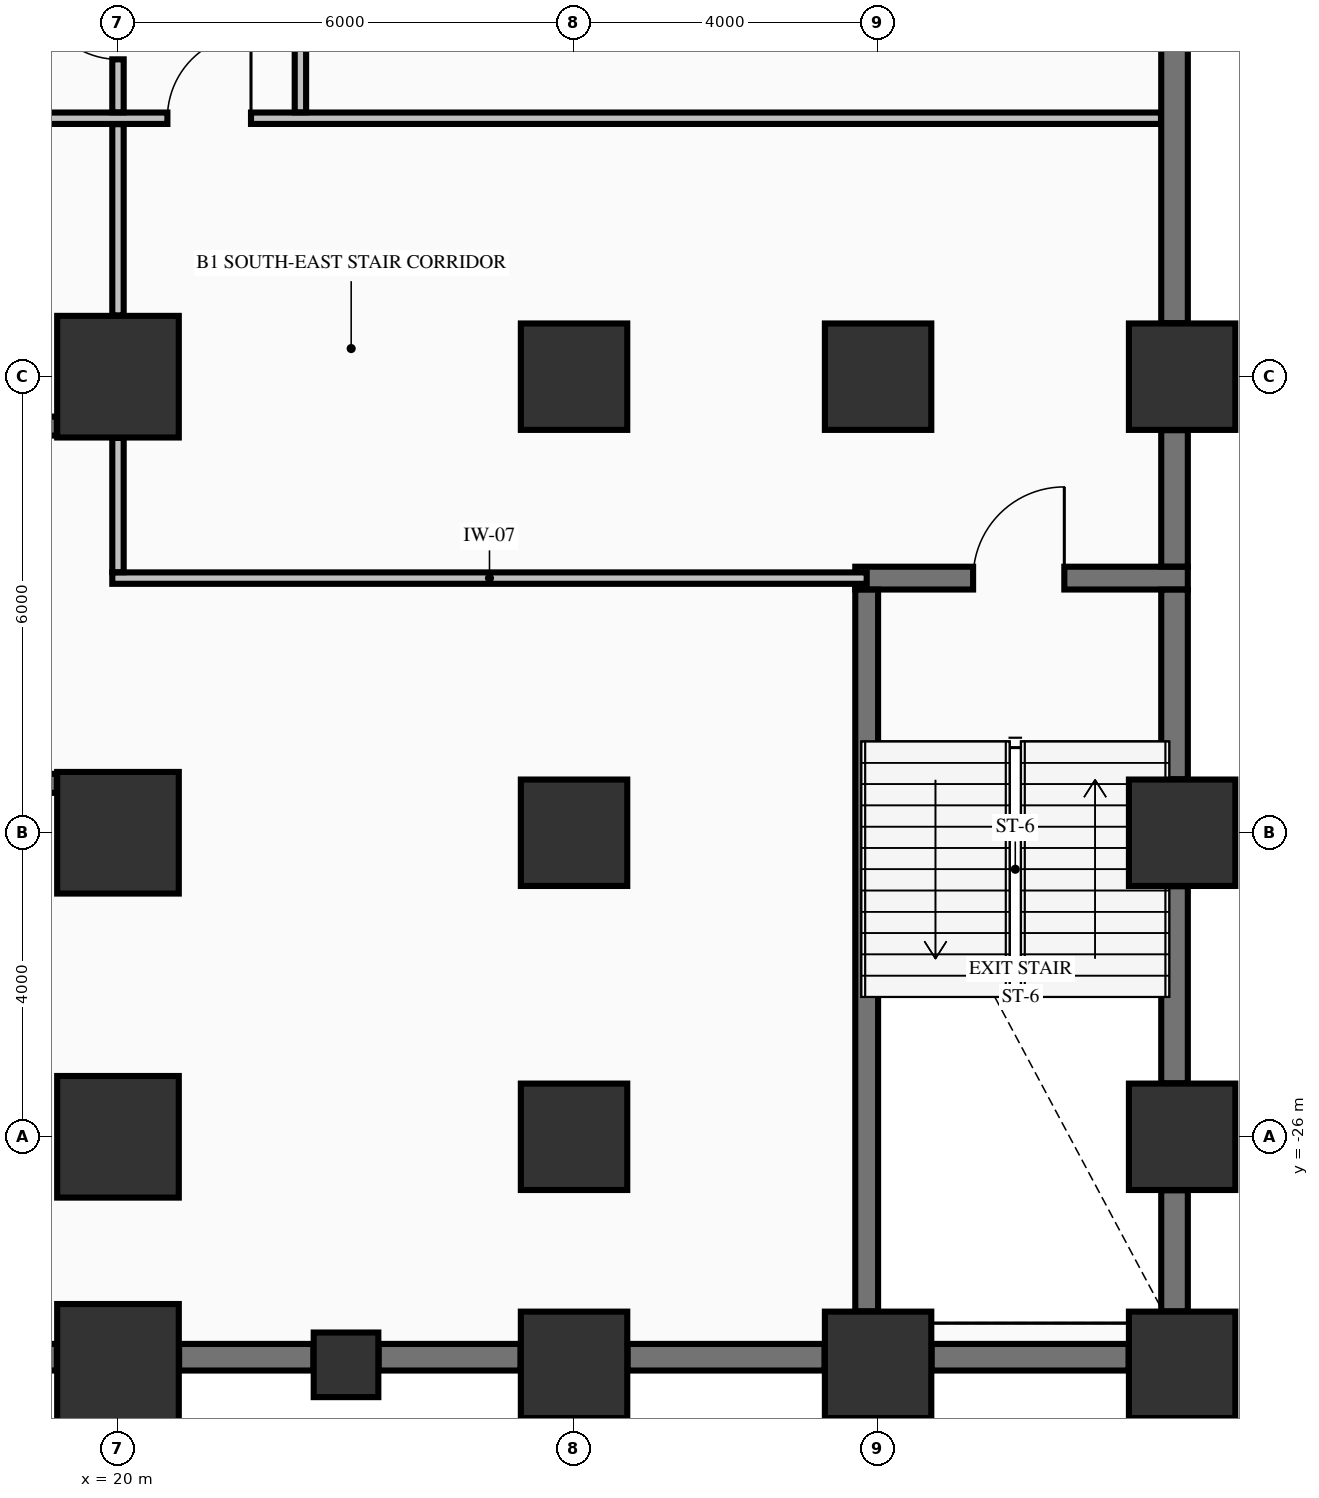
"""IFC4 building model, lengths in metres.
Left out: names, types, materials, properties, quantities, classifications, styles, units other than length and angle.
Written with IfcOpenShell. Run it as: python <this file> out.ifc"""

import sys

from ifc_helpers import new_model, si_unit, direction, frame, frame_2d, origin, origin_2d, place, context, subcontext, project, spatial, rectangle, extrude, element, fill, save


model = new_model("IFC4")
c1 = context("Model", 3, precision=1e-05, world=origin(), true_north=direction((0.0, 1.0)))
c2 = subcontext(c1, "Body", "Model", "MODEL_VIEW")
j1 = project(units=[si_unit("LENGTHUNIT", "METRE"), si_unit("PLANEANGLEUNIT", "RADIAN")], contexts=[c1])
p1 = place(None, origin())
s1 = spatial("IfcSite", under=j1, at=p1, CompositionType="ELEMENT")
p2 = place(p1, origin())
s2 = spatial("IfcBuilding", under=s1, at=p2, CompositionType="ELEMENT")
p3 = place(p2, frame((0.0, 0.0, -4.55)))
s3 = spatial("IfcBuildingStorey", under=s2, at=p3, CompositionType="ELEMENT", Elevation=-4.55)
for number, where, z_axis, x_axis in (
    (1, (20.0, -29.0, 0.0), (0.0, 0.0, 1.0), (1.0, 0.0, 0.0)),
    (2, (20.0, -26.0, 0.0), (0.0, 0.0, 1.0), (1.0, 0.0, 0.0)),
    (3, (20.0, -22.0, 0.0), (0.0, 0.0, 1.0), (1.0, 0.0, 0.0)),
    (4, (20.0, -16.0, 0.0), (0.0, 0.0, 1.0), (1.0, 0.0, 0.0)),
):
    element("IfcColumn", number, at=place(p3, frame(where, z_axis=z_axis, x_axis=x_axis)), inside=s3, PredefinedType="COLUMN", context=c2, shape_type="SweptSolid", body=[
        extrude(rectangle(XDim=1.6, YDim=1.6, at=origin_2d()), origin(), (0.0, 0.0, 1.0), 4.2),
    ])
for number, where, z_axis, x_axis in (
    (5, (26.0, -29.0, 0.0), (0.0, 0.0, 1.0), (1.0, 0.0, 0.0)),
    (6, (26.0, -26.0, 0.0), (0.0, 0.0, 1.0), (1.0, 0.0, 0.0)),
    (7, (26.0, -22.0, 0.0), (0.0, 0.0, 1.0), (1.0, 0.0, 0.0)),
    (8, (26.0, -16.0, 0.0), (0.0, 0.0, 1.0), (1.0, 0.0, 0.0)),
    (9, (30.0, -29.0, 0.0), (0.0, 0.0, 1.0), (1.0, 0.0, 0.0)),
    (10, (30.0, -16.0, 0.0), (0.0, 0.0, 1.0), (1.0, 0.0, 0.0)),
    (11, (34.0, -29.0, 0.0), (0.0, 0.0, 1.0), (1.0, 0.0, 0.0)),
    (12, (34.0, -26.0, 0.0), (0.0, 0.0, 1.0), (1.0, 0.0, 0.0)),
    (13, (34.0, -22.0, 0.0), (0.0, 0.0, 1.0), (1.0, 0.0, 0.0)),
    (14, (34.0, -16.0, 0.0), (0.0, 0.0, 1.0), (1.0, 0.0, 0.0)),
):
    element("IfcColumn", number, at=place(p3, frame(where, z_axis=z_axis, x_axis=x_axis)), inside=s3, PredefinedType="COLUMN", context=c2, shape_type="SweptSolid", body=[
        extrude(rectangle(XDim=1.4, YDim=1.4, at=origin_2d()), origin(), (0.0, 0.0, 1.0), 4.2),
    ])
p4 = place(p3, frame((23.0, -29.0, 0.0), z_axis=(0.0, 0.0, 1.0), x_axis=(1.0, 0.0, 0.0)))
e15 = element("IfcColumn", 15, at=p4, inside=s3, PredefinedType="PILASTER", context=c2, shape_type="SweptSolid", body=[
    extrude(rectangle(XDim=0.85, YDim=0.85, at=origin_2d()), origin(), (0.0, 0.0, 1.0), 4.2),
])
p5 = place(p3, frame((11.804, -28.9, 0.0), z_axis=(0.0, 0.0, 1.0), x_axis=(1.0, 0.0, 0.0)))
e16 = element("IfcWall", 16, at=p5, inside=s3, PredefinedType="SHEAR", context=c2, shape_type="SweptSolid", body=[
    extrude(rectangle(XDim=7.392, YDim=0.35, at=frame_2d((3.696, 0.0))), origin(), (0.0, 0.0, 1.0), 4.2),
])
p6 = place(p3, frame((20.804, -28.9, 0.0), z_axis=(0.0, 0.0, 1.0), x_axis=(1.0, 0.0, 0.0)))
e17 = element("IfcWall", 17, at=p6, inside=s3, PredefinedType="SHEAR", context=c2, shape_type="SweptSolid", body=[
    extrude(rectangle(XDim=1.767, YDim=0.35, at=frame_2d((0.884, 0.0))), origin(), (0.0, 0.0, 1.0), 4.2),
])
p7 = place(p3, frame((23.429, -28.9, 0.0), z_axis=(0.0, 0.0, 1.0), x_axis=(1.0, 0.0, 0.0)))
e18 = element("IfcWall", 18, at=p7, inside=s3, PredefinedType="SHEAR", context=c2, shape_type="SweptSolid", body=[
    extrude(rectangle(XDim=1.867, YDim=0.35, at=frame_2d((0.934, 0.0))), origin(), (0.0, 0.0, 1.0), 4.2),
])
for number, where, z_axis, x_axis in (
    (19, (26.704, -28.9, 0.0), (0.0, 0.0, 1.0), (1.0, 0.0, 0.0)),
    (20, (30.704, -28.9, 0.0), (0.0, 0.0, 1.0), (1.0, 0.0, 0.0)),
):
    element("IfcWall", number, at=place(p3, frame(where, z_axis=z_axis, x_axis=x_axis)), inside=s3, PredefinedType="SHEAR", context=c2, shape_type="SweptSolid", body=[
        extrude(rectangle(XDim=2.592, YDim=0.35, at=frame_2d((1.296, 0.0))), origin(), (0.0, 0.0, 1.0), 4.2),
    ])
p8 = place(p3, frame((11.804, -21.35, 0.0), z_axis=(0.0, 0.0, 1.0), x_axis=(1.0, 0.0, 0.0)))
e21 = element("IfcWall", 21, at=p8, inside=s3, PredefinedType="SOLIDWALL", context=c2, shape_type="SweptSolid", body=[
    extrude(rectangle(XDim=7.392, YDim=0.25, at=frame_2d((3.696, 0.0))), origin(), (0.0, 0.0, 1.0), 4.2),
])
p9 = place(p3, frame((29.7, -18.65, 0.0), z_axis=(0.0, 0.0, 1.0), x_axis=(1.0, 0.0, 0.0)))
e22 = element("IfcWall", 22, at=p9, inside=s3, PredefinedType="SHEAR", context=c2, shape_type="SweptSolid", body=[
    extrude(rectangle(XDim=4.375, YDim=0.3, at=frame_2d((2.188, 0.0))), origin(), (0.0, 0.0, 1.0), 4.2),
])
p10 = place(p9, frame((1.55, 0.0, 0.0)))
e23 = element("IfcOpeningElement", 23, at=p10, cuts=e22, PredefinedType="OPENING", context=c2, shape_type="SweptSolid", body=[
    extrude(rectangle(XDim=1.2, YDim=2.15, at=frame_2d((0.6, 1.075))), frame((0.0, 0.16, 0.0), z_axis=(0.0, -1.0, 0.0), x_axis=(1.0, 0.0, 0.0)), (0.0, 0.0, 1.0), 0.32),
])
p11 = place(p3, frame((11.804, -16.65, 0.0), z_axis=(0.0, 0.0, 1.0), x_axis=(1.0, 0.0, 0.0)))
e24 = element("IfcWall", 24, at=p11, inside=s3, PredefinedType="SOLIDWALL", context=c2, shape_type="SweptSolid", body=[
    extrude(rectangle(XDim=7.392, YDim=0.25, at=frame_2d((3.696, 0.0))), origin(), (0.0, 0.0, 1.0), 4.2),
])
p12 = place(p3, frame((19.925, -18.65, 0.0), z_axis=(0.0, 0.0, 1.0), x_axis=(1.0, 0.0, 0.0)))
e25 = element("IfcWall", 25, at=p12, inside=s3, PredefinedType="PARTITIONING", context=c2, shape_type="SweptSolid", body=[
    extrude(rectangle(XDim=9.925, YDim=0.15, at=frame_2d((4.962, 0.0))), origin(), (0.0, 0.0, 1.0), 4.2),
])
p13 = place(p3, frame((-33.722, -12.6, 0.0), z_axis=(0.0, 0.0, 1.0), x_axis=(1.0, 0.0, 0.0)))
e26 = element("IfcWall", 26, at=p13, inside=s3, PredefinedType="PARTITIONING", context=c2, shape_type="SweptSolid", body=[
    extrude(rectangle(XDim=67.444, YDim=0.15, at=frame_2d((33.722, 0.0))), origin(), (0.0, 0.0, 1.0), 3.74),
])
p14 = place(p13, frame((11.972, 0.0, 0.0)))
e27 = element("IfcOpeningElement", 27, at=p14, cuts=e26, PredefinedType="OPENING", context=c2, shape_type="SweptSolid", body=[
    extrude(rectangle(XDim=1.1, YDim=2.15, at=frame_2d((0.55, 1.075))), frame((0.0, 0.085, 0.0), z_axis=(0.0, -1.0, 0.0), x_axis=(1.0, 0.0, 0.0)), (0.0, 0.0, 1.0), 0.17),
])
p15 = place(p13, frame((54.372, 0.0, 0.0)))
e28 = element("IfcOpeningElement", 28, at=p15, cuts=e26, PredefinedType="OPENING", context=c2, shape_type="SweptSolid", body=[
    extrude(rectangle(XDim=1.1, YDim=2.15, at=frame_2d((0.55, 1.075))), frame((0.0, 0.085, 0.0), z_axis=(0.0, -1.0, 0.0), x_axis=(1.0, 0.0, 0.0)), (0.0, 0.0, 1.0), 0.17),
])
p16 = place(p13, frame((38.622, 0.0, 0.0)))
e29 = element("IfcOpeningElement", 29, at=p16, cuts=e26, PredefinedType="OPENING", context=c2, shape_type="SweptSolid", body=[
    extrude(rectangle(XDim=1.2, YDim=2.15, at=frame_2d((0.6, 1.075))), frame((0.0, 0.085, 0.0), z_axis=(0.0, -1.0, 0.0), x_axis=(1.0, 0.0, 0.0)), (0.0, 0.0, 1.0), 0.17),
])
p17 = place(p3, frame((29.85, -28.296, 0.0), z_axis=(0.0, 0.0, 1.0), x_axis=(0.0, 1.0, 0.0)))
e30 = element("IfcWall", 30, at=p17, inside=s3, PredefinedType="SHEAR", context=c2, shape_type="SweptSolid", body=[
    extrude(rectangle(XDim=9.494, YDim=0.3, at=frame_2d((4.747, 0.0))), origin(), (0.0, 0.0, 1.0), 4.2),
])
p18 = place(p3, frame((33.9, -28.296, 0.0), z_axis=(0.0, 0.0, 1.0), x_axis=(0.0, 1.0, 0.0)))
e31 = element("IfcWall", 31, at=p18, inside=s3, PredefinedType="SHEAR", context=c2, shape_type="SweptSolid", body=[
    extrude(rectangle(XDim=1.592, YDim=0.35, at=frame_2d((0.796, 0.0))), origin(), (0.0, 0.0, 1.0), 4.2),
])
p19 = place(p3, frame((33.9, -25.296, 0.0), z_axis=(0.0, 0.0, 1.0), x_axis=(0.0, 1.0, 0.0)))
e32 = element("IfcWall", 32, at=p19, inside=s3, PredefinedType="SHEAR", context=c2, shape_type="SweptSolid", body=[
    extrude(rectangle(XDim=2.592, YDim=0.35, at=frame_2d((1.296, 0.0))), origin(), (0.0, 0.0, 1.0), 4.2),
])
p20 = place(p3, frame((33.9, -21.296, 0.0), z_axis=(0.0, 0.0, 1.0), x_axis=(0.0, 1.0, 0.0)))
e33 = element("IfcWall", 33, at=p20, inside=s3, PredefinedType="SHEAR", context=c2, shape_type="SweptSolid", body=[
    extrude(rectangle(XDim=2.494, YDim=0.35, at=frame_2d((1.247, 0.0))), origin(), (0.0, 0.0, 1.0), 4.2),
])
p21 = place(p3, frame((33.9, -18.498, 0.0), z_axis=(0.0, 0.0, 1.0), x_axis=(0.0, 1.0, 0.0)))
e34 = element("IfcWall", 34, at=p21, inside=s3, PredefinedType="SHEAR", context=c2, shape_type="SweptSolid", body=[
    extrude(rectangle(XDim=1.794, YDim=0.35, at=frame_2d((0.897, 0.0))), origin(), (0.0, 0.0, 1.0), 4.2),
])
p22 = place(p3, frame((33.9, -15.296, 0.0), z_axis=(0.0, 0.0, 1.0), x_axis=(0.0, 1.0, 0.0)))
e35 = element("IfcWall", 35, at=p22, inside=s3, PredefinedType="SHEAR", context=c2, shape_type="SweptSolid", body=[
    extrude(rectangle(XDim=5.592, YDim=0.35, at=frame_2d((2.796, 0.0))), origin(), (0.0, 0.0, 1.0), 4.2),
])
p23 = place(p3, frame((20.0, -18.572, 0.0), z_axis=(0.0, 0.0, 1.0), x_axis=(0.0, 1.0, 0.0)))
e36 = element("IfcWall", 36, at=p23, inside=s3, PredefinedType="PARTITIONING", context=c2, shape_type="SweptSolid", body=[
    extrude(rectangle(XDim=1.766, YDim=0.15, at=frame_2d((0.883, 0.0))), origin(), (0.0, 0.0, 1.0), 3.242),
])
p24 = place(p3, frame((20.0, -15.194, 0.0), z_axis=(0.0, 0.0, 1.0), x_axis=(0.0, 1.0, 0.0)))
e37 = element("IfcWall", 37, at=p24, inside=s3, PredefinedType="PARTITIONING", context=c2, shape_type="SweptSolid", body=[
    extrude(rectangle(XDim=2.516, YDim=0.15, at=frame_2d((1.258, 0.0))), origin(), (0.0, 0.0, 1.0), 3.242),
])
p25 = place(p3, frame((20.0, -12.522, 0.0), z_axis=(0.0, 0.0, 1.0), x_axis=(0.0, 1.0, 0.0)))
e38 = element("IfcWall", 38, at=p25, inside=s3, PredefinedType="PARTITIONING", context=c2, shape_type="SweptSolid", body=[
    extrude(rectangle(XDim=2.394, YDim=0.15, at=frame_2d((1.197, 0.0))), origin(), (0.0, 0.0, 1.0), 3.242),
])
p26 = place(p25, frame((0.697, 0.0, 0.0)))
e39 = element("IfcOpeningElement", 39, at=p26, cuts=e38, PredefinedType="OPENING", context=c2, shape_type="SweptSolid", body=[
    extrude(rectangle(XDim=1.05, YDim=2.15, at=frame_2d((0.525, 1.075))), frame((0.0, 0.085, 0.0), z_axis=(0.0, -1.0, 0.0), x_axis=(1.0, 0.0, 0.0)), (0.0, 0.0, 1.0), 0.17),
])
p27 = place(p3, frame((22.4, -12.522, 0.0), z_axis=(0.0, 0.0, 1.0), x_axis=(0.0, 1.0, 0.0)))
e40 = element("IfcWall", 40, at=p27, inside=s3, PredefinedType="PARTITIONING", context=c2, shape_type="SweptSolid", body=[
    extrude(rectangle(XDim=25.644, YDim=0.15, at=frame_2d((12.822, 0.0))), origin(), (0.0, 0.0, 1.0), 4.2),
])
p28 = place(p10, origin())
e41 = element("IfcDoor", 41, at=p28, inside=s3, OperationType="SINGLE_SWING_RIGHT", PredefinedType="DOOR", context=c2, shape_type="SweptSolid", body=[
    extrude(rectangle(XDim=1.2, YDim=2.15, at=frame_2d((0.6, 1.075))), frame((0.0, 0.025, 0.0), z_axis=(0.0, -1.0, 0.0), x_axis=(1.0, 0.0, 0.0)), (0.0, 0.0, 1.0), 0.05),
])
fill(e23, e41)
p29 = place(p26, origin())
e42 = element("IfcDoor", 42, at=p29, inside=s3, OperationType="SINGLE_SWING_RIGHT", PredefinedType="DOOR", context=c2, shape_type="SweptSolid", body=[
    extrude(rectangle(XDim=1.05, YDim=2.15, at=frame_2d((0.525, 1.075))), frame((0.0, 0.025, 0.0), z_axis=(0.0, -1.0, 0.0), x_axis=(1.0, 0.0, 0.0)), (0.0, 0.0, 1.0), 0.05),
])
fill(e39, e42)
p30 = place(p15, origin())
e43 = element("IfcDoor", 43, at=p30, inside=s3, OperationType="SINGLE_SWING_RIGHT", PredefinedType="DOOR", context=c2, shape_type="SweptSolid", body=[
    extrude(rectangle(XDim=1.1, YDim=2.15, at=frame_2d((0.55, 1.075))), frame((0.0, 0.025, 0.0), z_axis=(0.0, -1.0, 0.0), x_axis=(1.0, 0.0, 0.0)), (0.0, 0.0, 1.0), 0.05),
])
fill(e28, e43)
save(model, sys.argv[1])
